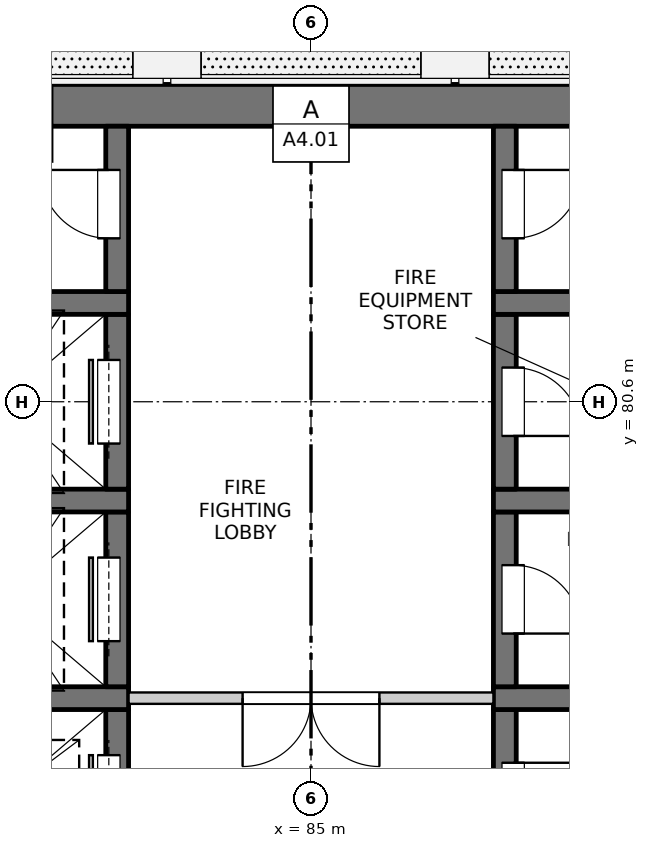
"""IFC4 building model, lengths in metres.
Left out: names, types, materials, properties, quantities, classifications, styles, units other than length and angle.
Written with IfcOpenShell. Run it as: python <this file> out.ifc"""

import sys

from ifc_helpers import new_model, si_unit, direction, frame, frame_2d, origin, place, context, subcontext, project, spatial, rectangle, extrude, element, fill, save


model = new_model("IFC4")
c1 = context("Model", 3, precision=1e-05, world=origin(), true_north=direction((0.0, 1.0)))
c2 = subcontext(c1, "Body", "Model", "MODEL_VIEW")
j1 = project(units=[si_unit("LENGTHUNIT", "METRE"), si_unit("PLANEANGLEUNIT", "RADIAN")], contexts=[c1])
p1 = place(None, origin())
s1 = spatial("IfcSite", under=j1, at=p1, CompositionType="ELEMENT")
p2 = place(p1, origin())
s2 = spatial("IfcBuilding", under=s1, at=p2, CompositionType="ELEMENT")
p3 = place(p2, frame((0.0, 0.0, 110.1)))
s3 = spatial("IfcBuildingStorey", under=s2, at=p3, CompositionType="ELEMENT", Elevation=110.1)
p4 = place(p3, frame((75.525, 84.5, -0.25), z_axis=(0.0, 0.0, 1.0), x_axis=(1.0, 0.0, 0.0)))
e1 = element("IfcWall", 1, at=p4, inside=s3, PredefinedType="SOLIDWALL", context=c2, shape_type="SweptSolid", body=[
    extrude(rectangle(XDim=18.95, YDim=0.55, at=frame_2d((9.475, 0.0))), origin(), (0.0, 0.0, 1.0), 3.4),
])
p5 = place(p3, frame((82.45, 74.25, -0.25), z_axis=(0.0, 0.0, 1.0), x_axis=(0.0, 1.0, 0.0)))
e2 = element("IfcWall", 2, at=p5, inside=s3, PredefinedType="SOLIDWALL", context=c2, shape_type="SweptSolid", body=[
    extrude(rectangle(XDim=2.3, YDim=0.3, at=frame_2d((1.15, 0.0))), origin(), (0.0, 0.0, 1.0), 3.4),
])
p6 = place(p5, frame((0.6, 0.0, 0.25)))
e3 = element("IfcOpeningElement", 3, at=p6, cuts=e2, PredefinedType="OPENING", context=c2, shape_type="SweptSolid", body=[
    extrude(rectangle(XDim=1.1, YDim=2.1, at=frame_2d((0.55, 1.05))), frame((0.0, 0.16, 0.0), z_axis=(0.0, -1.0, 0.0), x_axis=(1.0, 0.0, 0.0)), (0.0, 0.0, 1.0), 0.32),
])
p7 = place(p3, frame((79.6, 76.7, -0.25), z_axis=(0.0, 0.0, 1.0), x_axis=(1.0, 0.0, 0.0)))
e4 = element("IfcWall", 4, at=p7, inside=s3, PredefinedType="SOLIDWALL", context=c2, shape_type="SweptSolid", body=[
    extrude(rectangle(XDim=3.0, YDim=0.3, at=frame_2d((1.5, 0.0))), origin(), (0.0, 0.0, 1.0), 3.4),
])
p8 = place(p3, frame((82.45, 76.85, -0.25), z_axis=(0.0, 0.0, 1.0), x_axis=(0.0, 1.0, 0.0)))
e5 = element("IfcWall", 5, at=p8, inside=s3, PredefinedType="SOLIDWALL", context=c2, shape_type="SweptSolid", body=[
    extrude(rectangle(XDim=2.3, YDim=0.3, at=frame_2d((1.15, 0.0))), origin(), (0.0, 0.0, 1.0), 3.4),
])
p9 = place(p8, frame((0.6, 0.0, 0.25)))
e6 = element("IfcOpeningElement", 6, at=p9, cuts=e5, PredefinedType="OPENING", context=c2, shape_type="SweptSolid", body=[
    extrude(rectangle(XDim=1.1, YDim=2.1, at=frame_2d((0.55, 1.05))), frame((0.0, 0.16, 0.0), z_axis=(0.0, -1.0, 0.0), x_axis=(1.0, 0.0, 0.0)), (0.0, 0.0, 1.0), 0.32),
])
p10 = place(p3, frame((79.6, 79.3, -0.25), z_axis=(0.0, 0.0, 1.0), x_axis=(1.0, 0.0, 0.0)))
e7 = element("IfcWall", 7, at=p10, inside=s3, PredefinedType="SOLIDWALL", context=c2, shape_type="SweptSolid", body=[
    extrude(rectangle(XDim=3.0, YDim=0.3, at=frame_2d((1.5, 0.0))), origin(), (0.0, 0.0, 1.0), 3.4),
])
p11 = place(p3, frame((82.45, 79.45, -0.25), z_axis=(0.0, 0.0, 1.0), x_axis=(0.0, 1.0, 0.0)))
e8 = element("IfcWall", 8, at=p11, inside=s3, PredefinedType="SOLIDWALL", context=c2, shape_type="SweptSolid", body=[
    extrude(rectangle(XDim=2.3, YDim=0.3, at=frame_2d((1.15, 0.0))), origin(), (0.0, 0.0, 1.0), 3.4),
])
p12 = place(p11, frame((0.6, 0.0, 0.25)))
e9 = element("IfcOpeningElement", 9, at=p12, cuts=e8, PredefinedType="OPENING", context=c2, shape_type="SweptSolid", body=[
    extrude(rectangle(XDim=1.1, YDim=2.1, at=frame_2d((0.55, 1.05))), frame((0.0, 0.16, 0.0), z_axis=(0.0, -1.0, 0.0), x_axis=(1.0, 0.0, 0.0)), (0.0, 0.0, 1.0), 0.32),
])
p13 = place(p3, frame((79.6, 81.9, -0.25), z_axis=(0.0, 0.0, 1.0), x_axis=(1.0, 0.0, 0.0)))
e10 = element("IfcWall", 10, at=p13, inside=s3, PredefinedType="SOLIDWALL", context=c2, shape_type="SweptSolid", body=[
    extrude(rectangle(XDim=3.0, YDim=0.3, at=frame_2d((1.5, 0.0))), origin(), (0.0, 0.0, 1.0), 3.4),
])
p14 = place(p3, frame((82.45, 82.05, -0.25), z_axis=(0.0, 0.0, 1.0), x_axis=(0.0, 1.0, 0.0)))
e11 = element("IfcWall", 11, at=p14, inside=s3, PredefinedType="SOLIDWALL", context=c2, shape_type="SweptSolid", body=[
    extrude(rectangle(XDim=2.175, YDim=0.3, at=frame_2d((1.087, 0.0))), origin(), (0.0, 0.0, 1.0), 3.4),
])
p15 = place(p14, frame((0.7, 0.0, 0.25)))
e12 = element("IfcOpeningElement", 12, at=p15, cuts=e11, PredefinedType="OPENING", context=c2, shape_type="SweptSolid", body=[
    extrude(rectangle(XDim=0.9, YDim=2.1, at=frame_2d((0.45, 1.05))), frame((0.0, 0.16, 0.0), z_axis=(0.0, -1.0, 0.0), x_axis=(1.0, 0.0, 0.0)), (0.0, 0.0, 1.0), 0.32),
])
p16 = place(p3, frame((87.55, 74.25, -0.25), z_axis=(0.0, 0.0, 1.0), x_axis=(0.0, 1.0, 0.0)))
e13 = element("IfcWall", 13, at=p16, inside=s3, PredefinedType="SOLIDWALL", context=c2, shape_type="SweptSolid", body=[
    extrude(rectangle(XDim=2.3, YDim=0.3, at=frame_2d((1.15, 0.0))), origin(), (0.0, 0.0, 1.0), 3.4),
])
p17 = place(p16, frame((0.7, 0.0, 0.25)))
e14 = element("IfcOpeningElement", 14, at=p17, cuts=e13, PredefinedType="OPENING", context=c2, shape_type="SweptSolid", body=[
    extrude(rectangle(XDim=0.9, YDim=2.1, at=frame_2d((0.45, 1.05))), frame((0.0, 0.16, 0.0), z_axis=(0.0, -1.0, 0.0), x_axis=(1.0, 0.0, 0.0)), (0.0, 0.0, 1.0), 0.32),
])
p18 = place(p3, frame((87.4, 76.7, -0.25), z_axis=(0.0, 0.0, 1.0), x_axis=(1.0, 0.0, 0.0)))
e15 = element("IfcWall", 15, at=p18, inside=s3, PredefinedType="SOLIDWALL", context=c2, shape_type="SweptSolid", body=[
    extrude(rectangle(XDim=3.0, YDim=0.3, at=frame_2d((1.5, 0.0))), origin(), (0.0, 0.0, 1.0), 3.4),
])
p19 = place(p3, frame((87.55, 76.85, -0.25), z_axis=(0.0, 0.0, 1.0), x_axis=(0.0, 1.0, 0.0)))
e16 = element("IfcWall", 16, at=p19, inside=s3, PredefinedType="SOLIDWALL", context=c2, shape_type="SweptSolid", body=[
    extrude(rectangle(XDim=2.3, YDim=0.3, at=frame_2d((1.15, 0.0))), origin(), (0.0, 0.0, 1.0), 3.4),
])
p20 = place(p19, frame((0.7, 0.0, 0.25)))
e17 = element("IfcOpeningElement", 17, at=p20, cuts=e16, PredefinedType="OPENING", context=c2, shape_type="SweptSolid", body=[
    extrude(rectangle(XDim=0.9, YDim=2.1, at=frame_2d((0.45, 1.05))), frame((0.0, 0.16, 0.0), z_axis=(0.0, -1.0, 0.0), x_axis=(1.0, 0.0, 0.0)), (0.0, 0.0, 1.0), 0.32),
])
p21 = place(p3, frame((87.4, 79.3, -0.25), z_axis=(0.0, 0.0, 1.0), x_axis=(1.0, 0.0, 0.0)))
e18 = element("IfcWall", 18, at=p21, inside=s3, PredefinedType="SOLIDWALL", context=c2, shape_type="SweptSolid", body=[
    extrude(rectangle(XDim=3.0, YDim=0.3, at=frame_2d((1.5, 0.0))), origin(), (0.0, 0.0, 1.0), 3.4),
])
p22 = place(p3, frame((87.55, 79.45, -0.25), z_axis=(0.0, 0.0, 1.0), x_axis=(0.0, 1.0, 0.0)))
e19 = element("IfcWall", 19, at=p22, inside=s3, PredefinedType="SOLIDWALL", context=c2, shape_type="SweptSolid", body=[
    extrude(rectangle(XDim=2.3, YDim=0.3, at=frame_2d((1.15, 0.0))), origin(), (0.0, 0.0, 1.0), 3.4),
])
p23 = place(p22, frame((0.7, 0.0, 0.25)))
e20 = element("IfcOpeningElement", 20, at=p23, cuts=e19, PredefinedType="OPENING", context=c2, shape_type="SweptSolid", body=[
    extrude(rectangle(XDim=0.9, YDim=2.1, at=frame_2d((0.45, 1.05))), frame((0.0, 0.16, 0.0), z_axis=(0.0, -1.0, 0.0), x_axis=(1.0, 0.0, 0.0)), (0.0, 0.0, 1.0), 0.32),
])
p24 = place(p3, frame((87.4, 81.9, -0.25), z_axis=(0.0, 0.0, 1.0), x_axis=(1.0, 0.0, 0.0)))
e21 = element("IfcWall", 21, at=p24, inside=s3, PredefinedType="SOLIDWALL", context=c2, shape_type="SweptSolid", body=[
    extrude(rectangle(XDim=3.0, YDim=0.3, at=frame_2d((1.5, 0.0))), origin(), (0.0, 0.0, 1.0), 3.4),
])
p25 = place(p3, frame((87.55, 82.05, -0.25), z_axis=(0.0, 0.0, 1.0), x_axis=(0.0, 1.0, 0.0)))
e22 = element("IfcWall", 22, at=p25, inside=s3, PredefinedType="SOLIDWALL", context=c2, shape_type="SweptSolid", body=[
    extrude(rectangle(XDim=2.175, YDim=0.3, at=frame_2d((1.087, 0.0))), origin(), (0.0, 0.0, 1.0), 3.4),
])
p26 = place(p25, frame((0.7, 0.0, 0.25)))
e23 = element("IfcOpeningElement", 23, at=p26, cuts=e22, PredefinedType="OPENING", context=c2, shape_type="SweptSolid", body=[
    extrude(rectangle(XDim=0.9, YDim=2.1, at=frame_2d((0.45, 1.05))), frame((0.0, 0.16, 0.0), z_axis=(0.0, -1.0, 0.0), x_axis=(1.0, 0.0, 0.0)), (0.0, 0.0, 1.0), 0.32),
])
p27 = place(p3, frame((82.6, 76.7, 0.0), z_axis=(0.0, 0.0, 1.0), x_axis=(1.0, 0.0, 0.0)))
e24 = element("IfcWall", 24, at=p27, inside=s3, PredefinedType="PARTITIONING", context=c2, shape_type="SweptSolid", body=[
    extrude(rectangle(XDim=4.8, YDim=0.15, at=frame_2d((2.4, 0.0))), origin(), (0.0, 0.0, 1.0), 3.15),
])
p28 = place(p27, frame((1.5, 0.0, 0.0)))
e25 = element("IfcOpeningElement", 25, at=p28, cuts=e24, PredefinedType="OPENING", context=c2, shape_type="SweptSolid", body=[
    extrude(rectangle(XDim=1.8, YDim=2.1, at=frame_2d((0.9, 1.05))), frame((0.0, 0.085, 0.0), z_axis=(0.0, -1.0, 0.0), x_axis=(1.0, 0.0, 0.0)), (0.0, 0.0, 1.0), 0.17),
])
p29 = place(p6, origin())
e26 = element("IfcDoor", 26, at=p29, inside=s3, OperationType="SLIDING_TO_LEFT", PredefinedType="DOOR", context=c2, shape_type="SweptSolid", body=[
    extrude(rectangle(XDim=1.1, YDim=2.1, at=frame_2d((0.55, 1.05))), frame((0.0, 0.135, 0.0), z_axis=(0.0, -1.0, 0.0), x_axis=(1.0, 0.0, 0.0)), (0.0, 0.0, 1.0), 0.05),
])
fill(e3, e26)
p30 = place(p17, origin())
e27 = element("IfcDoor", 27, at=p30, inside=s3, OperationType="SINGLE_SWING_LEFT", PredefinedType="DOOR", context=c2, shape_type="SweptSolid", body=[
    extrude(rectangle(XDim=0.9, YDim=2.1, at=frame_2d((0.45, 1.05))), frame((0.0, -0.085, 0.0), z_axis=(0.0, -1.0, 0.0), x_axis=(1.0, 0.0, 0.0)), (0.0, 0.0, 1.0), 0.05),
])
fill(e14, e27)
p31 = place(p28, origin())
e28 = element("IfcDoor", 28, at=p31, inside=s3, OperationType="DOUBLE_DOOR_SINGLE_SWING", PredefinedType="DOOR", context=c2, shape_type="SweptSolid", body=[
    extrude(rectangle(XDim=1.8, YDim=2.1, at=frame_2d((0.9, 1.05))), frame((0.0, 0.025, 0.0), z_axis=(0.0, -1.0, 0.0), x_axis=(1.0, 0.0, 0.0)), (0.0, 0.0, 1.0), 0.05),
])
fill(e25, e28)
p32 = place(p9, origin())
e29 = element("IfcDoor", 29, at=p32, inside=s3, OperationType="SLIDING_TO_LEFT", PredefinedType="DOOR", context=c2, shape_type="SweptSolid", body=[
    extrude(rectangle(XDim=1.1, YDim=2.1, at=frame_2d((0.55, 1.05))), frame((0.0, 0.135, 0.0), z_axis=(0.0, -1.0, 0.0), x_axis=(1.0, 0.0, 0.0)), (0.0, 0.0, 1.0), 0.05),
])
fill(e6, e29)
p33 = place(p20, origin())
e30 = element("IfcDoor", 30, at=p33, inside=s3, OperationType="SINGLE_SWING_RIGHT", PredefinedType="DOOR", context=c2, shape_type="SweptSolid", body=[
    extrude(rectangle(XDim=0.9, YDim=2.1, at=frame_2d((0.45, 1.05))), frame((0.0, -0.085, 0.0), z_axis=(0.0, -1.0, 0.0), x_axis=(1.0, 0.0, 0.0)), (0.0, 0.0, 1.0), 0.05),
])
fill(e17, e30)
p34 = place(p12, origin())
e31 = element("IfcDoor", 31, at=p34, inside=s3, OperationType="SLIDING_TO_LEFT", PredefinedType="DOOR", context=c2, shape_type="SweptSolid", body=[
    extrude(rectangle(XDim=1.1, YDim=2.1, at=frame_2d((0.55, 1.05))), frame((0.0, 0.135, 0.0), z_axis=(0.0, -1.0, 0.0), x_axis=(1.0, 0.0, 0.0)), (0.0, 0.0, 1.0), 0.05),
])
fill(e9, e31)
p35 = place(p23, origin())
e32 = element("IfcDoor", 32, at=p35, inside=s3, OperationType="SINGLE_SWING_RIGHT", PredefinedType="DOOR", context=c2, shape_type="SweptSolid", body=[
    extrude(rectangle(XDim=0.9, YDim=2.1, at=frame_2d((0.45, 1.05))), frame((0.0, -0.085, 0.0), z_axis=(0.0, -1.0, 0.0), x_axis=(1.0, 0.0, 0.0)), (0.0, 0.0, 1.0), 0.05),
])
fill(e20, e32)
p36 = place(p15, origin())
e33 = element("IfcDoor", 33, at=p36, inside=s3, OperationType="SINGLE_SWING_RIGHT", PredefinedType="DOOR", context=c2, shape_type="SweptSolid", body=[
    extrude(rectangle(XDim=0.9, YDim=2.1, at=frame_2d((0.45, 1.05))), frame((0.0, 0.135, 0.0), z_axis=(0.0, -1.0, 0.0), x_axis=(1.0, 0.0, 0.0)), (0.0, 0.0, 1.0), 0.05),
])
fill(e12, e33)
p37 = place(p26, origin())
e34 = element("IfcDoor", 34, at=p37, inside=s3, OperationType="SINGLE_SWING_LEFT", PredefinedType="DOOR", context=c2, shape_type="SweptSolid", body=[
    extrude(rectangle(XDim=0.9, YDim=2.1, at=frame_2d((0.45, 1.05))), frame((0.0, -0.085, 0.0), z_axis=(0.0, -1.0, 0.0), x_axis=(1.0, 0.0, 0.0)), (0.0, 0.0, 1.0), 0.05),
])
fill(e23, e34)
save(model, sys.argv[1])
